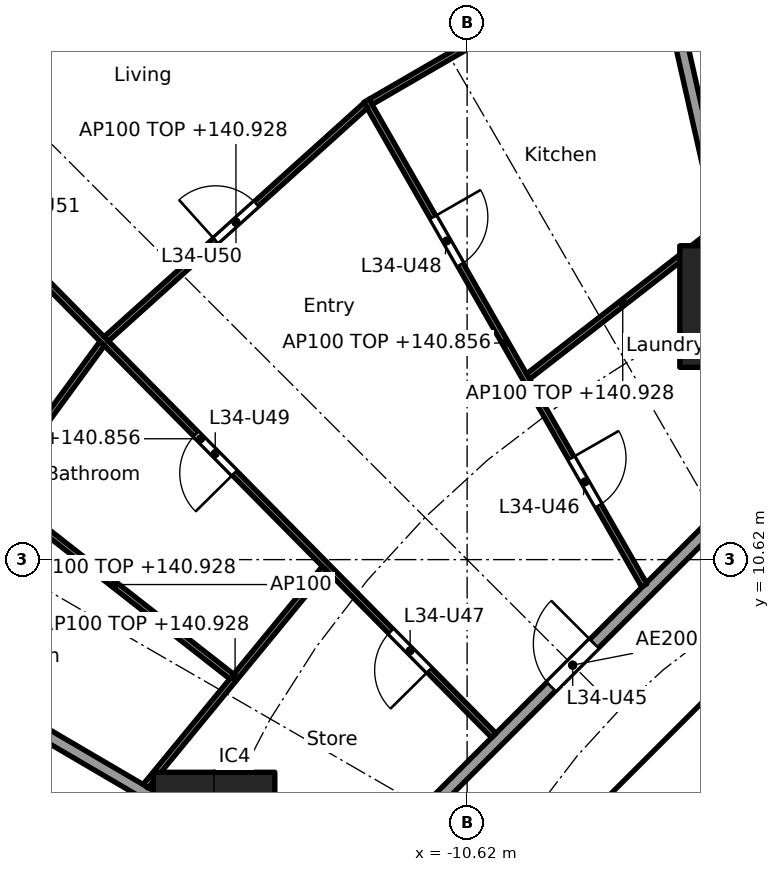
"""IFC4 building model, lengths in metres.
Left out: names, types, materials, properties, quantities, classifications, styles, units other than length and angle.
Written with IfcOpenShell. Run it as: python <this file> out.ifc"""

import sys

from ifc_helpers import new_model, si_unit, direction, frame, frame_2d, origin, origin_2d, place, context, subcontext, project, spatial, rectangle, extrude, element, fill, save


model = new_model("IFC4")
c1 = context("Model", 3, precision=1e-05, world=origin(), true_north=direction((0.0, 1.0)))
c2 = subcontext(c1, "Body", "Model", "MODEL_VIEW")
j1 = project(units=[si_unit("LENGTHUNIT", "METRE"), si_unit("PLANEANGLEUNIT", "RADIAN")], contexts=[c1])
p1 = place(None, origin())
s1 = spatial("IfcSite", under=j1, at=p1, CompositionType="ELEMENT")
p2 = place(p1, origin())
s2 = spatial("IfcBuilding", under=s1, at=p2, CompositionType="ELEMENT")
p3 = place(p2, frame((0.0, 0.0, 138.1)))
s3 = spatial("IfcBuildingStorey", under=s2, at=p3, CompositionType="ELEMENT", Elevation=138.1)
for number, where, z_axis, x_axis in (
    (1, (-6.123, 14.782, 0.0), (0.0, 0.0, 1.0), (1.0, 0.0, 0.0)),
    (2, (-14.782, 6.123, 0.0), (0.0, 0.0, 1.0), (1.0, 0.0, 0.0)),
):
    element("IfcColumn", number, at=place(p3, frame(where, z_axis=z_axis, x_axis=x_axis)), inside=s3, PredefinedType="COLUMN", context=c2, shape_type="SweptSolid", body=[
        extrude(rectangle(XDim=2.0, YDim=2.0, at=origin_2d()), origin(), (0.0, 0.0, 1.0), 3.7),
    ])
p4 = place(p3, frame((-4.613, 9.988, 0.0), z_axis=(0.0, 0.0, 1.0), x_axis=(-0.707106781187, -0.707106781187, 0.0)))
e3 = element("IfcWall", 3, at=p4, inside=s3, PredefinedType="SHEAR", context=c2, shape_type="SweptSolid", body=[
    extrude(rectangle(XDim=7.602, YDim=0.6, at=frame_2d((3.801, 0.0))), origin(), (0.0, 0.0, 1.0), 3.44),
])
p5 = place(p4, frame((0.351, 0.0, 0.0)))
e4 = element("IfcOpeningElement", 4, at=p5, cuts=e3, PredefinedType="OPENING", context=c2, shape_type="SweptSolid", body=[
    extrude(rectangle(XDim=1.1, YDim=2.1, at=frame_2d((0.55, 1.05))), frame((0.0, 0.31, 0.0), z_axis=(0.0, -1.0, 0.0), x_axis=(1.0, 0.0, 0.0)), (0.0, 0.0, 1.0), 0.62),
])
p6 = place(p3, frame((-6.134, 14.831, 0.0), z_axis=(0.0, 0.0, 1.0), x_axis=(-0.220337590808, 0.975423675167, 0.0)))
e5 = element("IfcWall", 5, at=p6, inside=s3, PredefinedType="PARTITIONING", context=c2, shape_type="SweptSolid", body=[
    extrude(rectangle(XDim=10.451, YDim=0.2, at=frame_2d((5.226, 0.0))), origin(), (0.0, 0.0, 1.0), 2.828),
])
p7 = place(p3, frame((-14.825, 6.148, 0.0), z_axis=(0.0, 0.0, 1.0), x_axis=(-0.862852031662, 0.505456597006, 0.0)))
e6 = element("IfcWall", 6, at=p7, inside=s3, PredefinedType="PARTITIONING", context=c2, shape_type="SweptSolid", body=[
    extrude(rectangle(XDim=10.487, YDim=0.2, at=frame_2d((5.244, 0.0))), origin(), (0.0, 0.0, 1.0), 2.828),
])
p8 = place(p3, frame((-5.275, 12.494, 0.0), z_axis=(0.0, 0.0, 1.0), x_axis=(-0.707106781187, -0.707106781187, 0.0)))
e7 = element("IfcWall", 7, at=p8, inside=s3, PredefinedType="PARTITIONING", context=c2, shape_type="SweptSolid", body=[
    extrude(rectangle(XDim=10.209, YDim=0.2, at=frame_2d((5.104, 0.0))), origin(), (0.0, 0.0, 1.0), 3.44),
])
p9 = place(p8, frame((4.604, 0.0, 0.0)))
e8 = element("IfcOpeningElement", 8, at=p9, cuts=e7, PredefinedType="OPENING", context=c2, shape_type="SweptSolid", body=[
    extrude(rectangle(XDim=1.0, YDim=2.1, at=frame_2d((0.5, 1.05))), frame((0.0, 0.11, 0.0), z_axis=(0.0, -1.0, 0.0), x_axis=(1.0, 0.0, 0.0)), (0.0, 0.0, 1.0), 0.22),
])
p10 = place(p3, frame((-6.503, 16.054, 0.0), z_axis=(0.0, 0.0, 1.0), x_axis=(-0.789428807693, -0.613842127574, 0.0)))
e9 = element("IfcWall", 9, at=p10, inside=s3, PredefinedType="PARTITIONING", context=c2, shape_type="SweptSolid", body=[
    extrude(rectangle(XDim=3.948, YDim=0.1, at=frame_2d((1.974, 0.0))), origin(), (0.0, 0.0, 1.0), 2.828),
])
p11 = place(p3, frame((-7.586, 20.827, 0.0), z_axis=(0.0, 0.0, 1.0), x_axis=(-0.865093450578, -0.501610727325, 0.0)))
e10 = element("IfcWall", 10, at=p11, inside=s3, PredefinedType="PARTITIONING", context=c2, shape_type="SweptSolid", body=[
    extrude(rectangle(XDim=5.343, YDim=0.1, at=frame_2d((2.671, 0.0))), origin(), (0.0, 0.0, 1.0), 2.828),
])
p12 = place(p3, frame((-7.708, 10.198, 0.0), z_axis=(0.0, 0.0, 1.0), x_axis=(-0.497449462689, 0.867492957937, 0.0)))
e11 = element("IfcWall", 11, at=p12, inside=s3, PredefinedType="PARTITIONING", context=c2, shape_type="SweptSolid", body=[
    extrude(rectangle(XDim=9.185, YDim=0.1, at=frame_2d((4.592, 0.0))), origin(), (0.0, 0.0, 1.0), 2.756),
])
p13 = place(p12, frame((1.511, 0.0, 0.0)))
e12 = element("IfcOpeningElement", 12, at=p13, cuts=e11, PredefinedType="OPENING", context=c2, shape_type="SweptSolid", body=[
    extrude(rectangle(XDim=0.9, YDim=2.1, at=frame_2d((0.45, 1.05))), frame((0.0, 0.06, 0.0), z_axis=(0.0, -1.0, 0.0), x_axis=(1.0, 0.0, 0.0)), (0.0, 0.0, 1.0), 0.12),
])
p14 = place(p12, frame((6.078, 0.0, 0.0)))
e13 = element("IfcOpeningElement", 13, at=p14, cuts=e11, PredefinedType="OPENING", context=c2, shape_type="SweptSolid", body=[
    extrude(rectangle(XDim=0.9, YDim=2.1, at=frame_2d((0.45, 1.05))), frame((0.0, 0.06, 0.0), z_axis=(0.0, -1.0, 0.0), x_axis=(1.0, 0.0, 0.0)), (0.0, 0.0, 1.0), 0.12),
])
p15 = place(p3, frame((-12.289, 18.089, 0.0), z_axis=(0.0, 0.0, 1.0), x_axis=(-0.743146066164, -0.669129228435, 0.0)))
e14 = element("IfcWall", 14, at=p15, inside=s3, PredefinedType="PARTITIONING", context=c2, shape_type="SweptSolid", body=[
    extrude(rectangle(XDim=5.739, YDim=0.1, at=frame_2d((2.87, 0.0))), origin(), (0.0, 0.0, 1.0), 2.828),
])
p16 = place(p15, frame((2.42, 0.0, 0.0)))
e15 = element("IfcOpeningElement", 15, at=p16, cuts=e14, PredefinedType="OPENING", context=c2, shape_type="SweptSolid", body=[
    extrude(rectangle(XDim=0.9, YDim=2.1, at=frame_2d((0.45, 1.05))), frame((0.0, 0.06, 0.0), z_axis=(0.0, -1.0, 0.0), x_axis=(1.0, 0.0, 0.0)), (0.0, 0.0, 1.0), 0.12),
])
p17 = place(p3, frame((-10.182, 7.729, 0.0), z_axis=(0.0, 0.0, 1.0), x_axis=(-0.702930219229, 0.7112588185, 0.0)))
e16 = element("IfcWall", 16, at=p17, inside=s3, PredefinedType="PARTITIONING", context=c2, shape_type="SweptSolid", body=[
    extrude(rectangle(XDim=13.719, YDim=0.1, at=frame_2d((6.859, 0.0))), origin(), (0.0, 0.0, 1.0), 2.756),
])
p18 = place(p17, frame((1.507, 0.0, 0.0)))
e17 = element("IfcOpeningElement", 17, at=p18, cuts=e16, PredefinedType="OPENING", context=c2, shape_type="SweptSolid", body=[
    extrude(rectangle(XDim=0.9, YDim=2.1, at=frame_2d((0.45, 1.05))), frame((0.0, 0.06, 0.0), z_axis=(0.0, -1.0, 0.0), x_axis=(1.0, 0.0, 0.0)), (0.0, 0.0, 1.0), 0.12),
])
p19 = place(p17, frame((6.067, 0.0, 0.0)))
e18 = element("IfcOpeningElement", 18, at=p19, cuts=e16, PredefinedType="OPENING", context=c2, shape_type="SweptSolid", body=[
    extrude(rectangle(XDim=0.9, YDim=2.1, at=frame_2d((0.45, 1.05))), frame((0.0, 0.06, 0.0), z_axis=(0.0, -1.0, 0.0), x_axis=(1.0, 0.0, 0.0)), (0.0, 0.0, 1.0), 0.12),
])
p20 = place(p17, frame((10.969, 0.0, 0.0)))
e19 = element("IfcOpeningElement", 19, at=p20, cuts=e16, PredefinedType="OPENING", context=c2, shape_type="SweptSolid", body=[
    extrude(rectangle(XDim=0.9, YDim=2.1, at=frame_2d((0.45, 1.05))), frame((0.0, 0.06, 0.0), z_axis=(0.0, -1.0, 0.0), x_axis=(1.0, 0.0, 0.0)), (0.0, 0.0, 1.0), 0.12),
])
p21 = place(p3, frame((-12.965, 10.475, 0.0), z_axis=(0.0, 0.0, 1.0), x_axis=(-0.634943961338, -0.772558195841, 0.0)))
e20 = element("IfcWall", 20, at=p21, inside=s3, PredefinedType="PARTITIONING", context=c2, shape_type="SweptSolid", body=[
    extrude(rectangle(XDim=4.632, YDim=0.1, at=frame_2d((2.316, 0.0))), origin(), (0.0, 0.0, 1.0), 2.828),
])
p22 = place(p3, frame((-16.621, 14.174, 0.0), z_axis=(0.0, 0.0, 1.0), x_axis=(-0.590674917338, -0.806909624449, 0.0)))
e21 = element("IfcWall", 21, at=p22, inside=s3, PredefinedType="PARTITIONING", context=c2, shape_type="SweptSolid", body=[
    extrude(rectangle(XDim=5.949, YDim=0.1, at=frame_2d((2.975, 0.0))), origin(), (0.0, 0.0, 1.0), 2.828),
])
p23 = place(p22, frame((4.024, 0.0, 0.0)))
e22 = element("IfcOpeningElement", 22, at=p23, cuts=e21, PredefinedType="OPENING", context=c2, shape_type="SweptSolid", body=[
    extrude(rectangle(XDim=0.9, YDim=2.1, at=frame_2d((0.45, 1.05))), frame((0.0, 0.06, 0.0), z_axis=(0.0, -1.0, 0.0), x_axis=(1.0, 0.0, 0.0)), (0.0, 0.0, 1.0), 0.12),
])
p24 = place(p3, frame((-14.491, 8.697, 0.0), z_axis=(0.0, 0.0, 1.0), x_axis=(-0.787139479951, 0.616775031193, 0.0)))
e23 = element("IfcWall", 23, at=p24, inside=s3, PredefinedType="PARTITIONING", context=c2, shape_type="SweptSolid", body=[
    extrude(rectangle(XDim=4.907, YDim=0.1, at=frame_2d((2.453, 0.0))), origin(), (0.0, 0.0, 1.0), 3.44),
])
p25 = place(p9, frame((1.0, 0.0, 0.0), x_axis=(-1.0, 0.0, 0.0)))
e24 = element("IfcDoor", 24, at=p25, inside=s3, OperationType="SINGLE_SWING_RIGHT", PredefinedType="DOOR", context=c2, shape_type="SweptSolid", body=[
    extrude(rectangle(XDim=1.0, YDim=2.1, at=frame_2d((0.5, 1.05))), frame((0.0, 0.025, 0.0), z_axis=(0.0, -1.0, 0.0), x_axis=(1.0, 0.0, 0.0)), (0.0, 0.0, 1.0), 0.05),
])
fill(e8, e24)
p26 = place(p13, frame((0.9, 0.0, 0.0), x_axis=(-1.0, 0.0, 0.0)))
e25 = element("IfcDoor", 25, at=p26, inside=s3, OperationType="SINGLE_SWING_LEFT", PredefinedType="DOOR", context=c2, shape_type="SweptSolid", body=[
    extrude(rectangle(XDim=0.9, YDim=2.1, at=frame_2d((0.45, 1.05))), frame((0.0, 0.025, 0.0), z_axis=(0.0, -1.0, 0.0), x_axis=(1.0, 0.0, 0.0)), (0.0, 0.0, 1.0), 0.05),
])
fill(e12, e25)
p27 = place(p18, origin())
e26 = element("IfcDoor", 26, at=p27, inside=s3, OperationType="SINGLE_SWING_LEFT", PredefinedType="DOOR", context=c2, shape_type="SweptSolid", body=[
    extrude(rectangle(XDim=0.9, YDim=2.1, at=frame_2d((0.45, 1.05))), frame((0.0, 0.025, 0.0), z_axis=(0.0, -1.0, 0.0), x_axis=(1.0, 0.0, 0.0)), (0.0, 0.0, 1.0), 0.05),
])
fill(e17, e26)
p28 = place(p14, frame((0.9, 0.0, 0.0), x_axis=(-1.0, 0.0, 0.0)))
e27 = element("IfcDoor", 27, at=p28, inside=s3, OperationType="SINGLE_SWING_LEFT", PredefinedType="DOOR", context=c2, shape_type="SweptSolid", body=[
    extrude(rectangle(XDim=0.9, YDim=2.1, at=frame_2d((0.45, 1.05))), frame((0.0, 0.025, 0.0), z_axis=(0.0, -1.0, 0.0), x_axis=(1.0, 0.0, 0.0)), (0.0, 0.0, 1.0), 0.05),
])
fill(e13, e27)
p29 = place(p19, origin())
e28 = element("IfcDoor", 28, at=p29, inside=s3, OperationType="SINGLE_SWING_LEFT", PredefinedType="DOOR", context=c2, shape_type="SweptSolid", body=[
    extrude(rectangle(XDim=0.9, YDim=2.1, at=frame_2d((0.45, 1.05))), frame((0.0, 0.025, 0.0), z_axis=(0.0, -1.0, 0.0), x_axis=(1.0, 0.0, 0.0)), (0.0, 0.0, 1.0), 0.05),
])
fill(e18, e28)
p30 = place(p16, frame((0.9, 0.0, 0.0), x_axis=(-1.0, 0.0, 0.0)))
e29 = element("IfcDoor", 29, at=p30, inside=s3, OperationType="SINGLE_SWING_LEFT", PredefinedType="DOOR", context=c2, shape_type="SweptSolid", body=[
    extrude(rectangle(XDim=0.9, YDim=2.1, at=frame_2d((0.45, 1.05))), frame((0.0, 0.025, 0.0), z_axis=(0.0, -1.0, 0.0), x_axis=(1.0, 0.0, 0.0)), (0.0, 0.0, 1.0), 0.05),
])
fill(e15, e29)
save(model, sys.argv[1])
